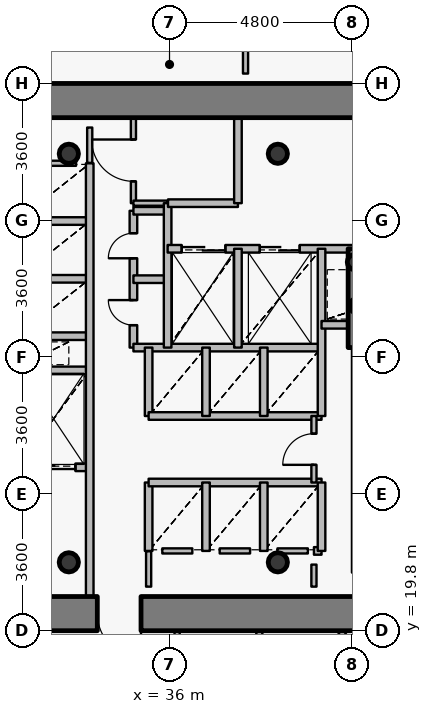
"""IFC4 building model, lengths in metres.
Left out: names, types, materials, properties, quantities, classifications, styles, units other than length and angle.
Written with IfcOpenShell. Run it as: python <this file> out.ifc"""

import sys

from ifc_helpers import new_model, si_unit, direction, frame, frame_2d, origin, origin_2d, place, context, subcontext, project, spatial, rectangle, hollow_circle, extrude, source, transform, mapped, element, fill, save


model = new_model("IFC4")
c1 = context("Model", 3, precision=1e-05, world=origin(), true_north=direction((0.0, 1.0)))
c2 = subcontext(c1, "Body", "Model", "MODEL_VIEW")
j1 = project(units=[si_unit("LENGTHUNIT", "METRE"), si_unit("PLANEANGLEUNIT", "RADIAN")], contexts=[c1])
p1 = place(None, origin())
s1 = spatial("IfcSite", under=j1, at=p1, CompositionType="ELEMENT")
p2 = place(p1, origin())
s2 = spatial("IfcBuilding", under=s1, at=p2, CompositionType="ELEMENT")
p3 = place(p2, frame((0.0, 0.0, 6.0)))
s3 = spatial("IfcBuildingStorey", under=s2, at=p3, CompositionType="ELEMENT", Elevation=6.0)
for number, where, z_axis, x_axis in (
    (1, (33.35, 21.6, 0.0), (0.0, 0.0, 1.0), (1.0, 0.0, 0.0)),
    (2, (38.85, 21.6, 0.0), (0.0, 0.0, 1.0), (1.0, 0.0, 0.0)),
    (3, (38.85, 32.35, 0.0), (0.0, 0.0, 1.0), (1.0, 0.0, 0.0)),
    (4, (33.35, 32.35, 0.0), (0.0, 0.0, 1.0), (1.0, 0.0, 0.0)),
):
    element("IfcColumn", number, at=place(p3, frame(where, z_axis=z_axis, x_axis=x_axis)), inside=s3, PredefinedType="COLUMN", context=c2, shape_type="SweptSolid", body=[
        extrude(hollow_circle(Radius=0.254, WallThickness=0.02, at=origin_2d()), origin(), (0.0, 0.0, 1.0), 4.2),
    ])
for number, where, z_axis, x_axis in (
    (5, (40.95, 28.35, 0.0), (0.0, 0.0, 1.0), (1.0, 0.0, 0.0)),
    (6, (40.88, 29.5, 0.0), (0.0, 0.0, 1.0), (1.0, 0.0, 0.0)),
):
    element("IfcColumn", number, at=place(p3, frame(where, z_axis=z_axis, x_axis=x_axis)), inside=s3, PredefinedType="COLUMN", context=c2, shape_type="SweptSolid", body=[
        extrude(hollow_circle(Radius=0.203, WallThickness=0.016, at=origin_2d()), origin(), (0.0, 0.0, 1.0), 4.2),
    ])
p4 = place(p3, frame((26.75, 33.75, 0.0), z_axis=(0.0, 0.0, 1.0), x_axis=(1.0, 0.0, 0.0)))
e7 = element("IfcWall", 7, at=p4, inside=s3, PredefinedType="SHEAR", context=c2, shape_type="SweptSolid", body=[
    extrude(rectangle(XDim=18.5, YDim=0.9, at=frame_2d((9.25, 0.0))), origin(), (0.0, 0.0, 1.0), 3.35),
])
p5 = place(p3, frame((45.25, 20.25, 0.0), z_axis=(0.0, 0.0, 1.0), x_axis=(-1.0, 0.0, 0.0)))
e8 = element("IfcWall", 8, at=p5, inside=s3, PredefinedType="SHEAR", context=c2, shape_type="SweptSolid", body=[
    extrude(rectangle(XDim=18.5, YDim=0.9, at=frame_2d((9.25, 0.0))), origin(), (0.0, 0.0, 1.0), 3.35),
])
p6 = place(p5, frame((10.0, 0.0, 0.0)))
e9 = element("IfcOpeningElement", 9, at=p6, cuts=e8, PredefinedType="OPENING", context=c2, shape_type="SweptSolid", body=[
    extrude(rectangle(XDim=1.15, YDim=2.15, at=origin_2d()), frame((0.575, 0.46, 1.075), z_axis=(0.0, -1.0, 0.0), x_axis=(1.0, 0.0, 0.0)), (0.0, 0.0, 1.0), 0.92),
])
p7 = place(p3, frame((40.9, 27.25, 0.0), z_axis=(0.0, 0.0, 1.0), x_axis=(0.0, 1.0, 0.0)))
e10 = element("IfcWall", 10, at=p7, inside=s3, PredefinedType="SHEAR", context=c2, shape_type="SweptSolid", body=[
    extrude(rectangle(XDim=2.6, YDim=0.4, at=frame_2d((1.3, 0.0))), origin(), (0.0, 0.0, 1.0), 3.5),
])
p8 = place(p3, frame((32.0, 24.1, 0.0), z_axis=(0.0, 0.0, 1.0), x_axis=(1.0, 0.0, 0.0)))
e11 = element("IfcWall", 11, at=p8, inside=s3, PredefinedType="PARTITIONING", context=c2, shape_type="SweptSolid", body=[
    extrude(rectangle(XDim=1.9, YDim=0.2, at=frame_2d((0.95, 0.0))), origin(), (0.0, 0.0, 1.0), 3.485),
])
p9 = place(p8, frame((0.375, 0.0, 0.0)))
e12 = element("IfcOpeningElement", 12, at=p9, cuts=e11, PredefinedType="OPENING", context=c2, shape_type="SweptSolid", body=[
    extrude(rectangle(XDim=1.15, YDim=2.15, at=origin_2d()), frame((0.575, 0.11, 1.075), z_axis=(0.0, -1.0, 0.0), x_axis=(1.0, 0.0, 0.0)), (0.0, 0.0, 1.0), 0.22),
])
for number, where, z_axis, x_axis in (
    (13, (32.0, 26.65, 0.0), (0.0, 0.0, 1.0), (1.0, 0.0, 0.0)),
    (14, (32.0, 27.55, 0.0), (0.0, 0.0, 1.0), (1.0, 0.0, 0.0)),
    (15, (32.0, 29.06, 0.0), (0.0, 0.0, 1.0), (1.0, 0.0, 0.0)),
    (16, (32.0, 30.58, 0.0), (0.0, 0.0, 1.0), (1.0, 0.0, 0.0)),
):
    element("IfcWall", number, at=place(p3, frame(where, z_axis=z_axis, x_axis=x_axis)), inside=s3, PredefinedType="PARTITIONING", context=c2, shape_type="SweptSolid", body=[
        extrude(rectangle(XDim=1.9, YDim=0.2, at=frame_2d((0.95, 0.0))), origin(), (0.0, 0.0, 1.0), 3.485),
    ])
p10 = place(p3, frame((33.9, 20.7, 0.0), z_axis=(0.0, 0.0, 1.0), x_axis=(0.0, 1.0, 0.0)))
e17 = element("IfcWall", 17, at=p10, inside=s3, PredefinedType="PARTITIONING", context=c2, shape_type="SweptSolid", body=[
    extrude(rectangle(XDim=11.4, YDim=0.2, at=frame_2d((5.7, 0.0))), origin(), (0.0, 0.0, 1.0), 3.485),
])
p11 = place(p3, frame((35.05, 27.25, 0.0), z_axis=(0.0, 0.0, 1.0), x_axis=(0.0, 1.0, 0.0)))
e18 = element("IfcWall", 18, at=p11, inside=s3, PredefinedType="PARTITIONING", context=c2, shape_type="SweptSolid", body=[
    extrude(rectangle(XDim=3.6, YDim=0.2, at=frame_2d((1.8, 0.0))), origin(), (0.0, 0.0, 1.0), 3.9),
])
p12 = place(p11, frame((0.59, 0.0, 0.0)))
e19 = element("IfcOpeningElement", 19, at=p12, cuts=e18, PredefinedType="OPENING", context=c2, shape_type="SweptSolid", body=[
    extrude(rectangle(XDim=0.66, YDim=2.05, at=origin_2d()), frame((0.33, 0.11, 1.025), z_axis=(0.0, -1.0, 0.0), x_axis=(1.0, 0.0, 0.0)), (0.0, 0.0, 1.0), 0.22),
])
p13 = place(p11, frame((2.35, 0.0, 0.0)))
e20 = element("IfcOpeningElement", 20, at=p13, cuts=e18, PredefinedType="OPENING", context=c2, shape_type="SweptSolid", body=[
    extrude(rectangle(XDim=0.66, YDim=2.05, at=origin_2d()), frame((0.33, 0.11, 1.025), z_axis=(0.0, -1.0, 0.0), x_axis=(1.0, 0.0, 0.0)), (0.0, 0.0, 1.0), 0.22),
])
p14 = place(p3, frame((35.05, 27.25, 0.0), z_axis=(0.0, 0.0, 1.0), x_axis=(1.0, 0.0, 0.0)))
e21 = element("IfcWall", 21, at=p14, inside=s3, PredefinedType="PARTITIONING", context=c2, shape_type="SweptSolid", body=[
    extrude(rectangle(XDim=4.95, YDim=0.2, at=frame_2d((2.475, 0.0))), origin(), (0.0, 0.0, 1.0), 3.485),
])
for number, where, z_axis, x_axis in (
    (22, (35.05, 29.05, 0.0), (0.0, 0.0, 1.0), (1.0, 0.0, 0.0)),
    (23, (35.05, 30.85, 0.0), (0.0, 0.0, 1.0), (1.0, 0.0, 0.0)),
):
    element("IfcWall", number, at=place(p3, frame(where, z_axis=z_axis, x_axis=x_axis)), inside=s3, PredefinedType="PARTITIONING", context=c2, shape_type="SweptSolid", body=[
        extrude(rectangle(XDim=0.9, YDim=0.2, at=frame_2d((0.45, 0.0))), origin(), (0.0, 0.0, 1.0), 3.9),
    ])
p15 = place(p3, frame((35.05, 31.05, 0.0), z_axis=(0.0, 0.0, 1.0), x_axis=(0.0, 1.0, 0.0)))
e24 = element("IfcWall", 24, at=p15, inside=s3, PredefinedType="PARTITIONING", context=c2, shape_type="SweptSolid", body=[
    extrude(rectangle(XDim=2.25, YDim=0.135, at=frame_2d((1.125, 0.0))), origin(), (0.0, 0.0, 1.0), 3.485),
])
p16 = place(p15, frame((0.575, 0.0, 0.0)))
e25 = element("IfcOpeningElement", 25, at=p16, cuts=e24, PredefinedType="OPENING", context=c2, shape_type="SweptSolid", body=[
    extrude(rectangle(XDim=1.1, YDim=2.15, at=origin_2d()), frame((0.55, 0.078, 1.075), z_axis=(0.0, -1.0, 0.0), x_axis=(1.0, 0.0, 0.0)), (0.0, 0.0, 1.0), 0.155),
])
p17 = place(p3, frame((35.05, 31.05, 0.0), z_axis=(0.0, 0.0, 1.0), x_axis=(1.0, 0.0, 0.0)))
e26 = element("IfcWall", 26, at=p17, inside=s3, PredefinedType="PARTITIONING", context=c2, shape_type="SweptSolid", body=[
    extrude(rectangle(XDim=0.9, YDim=0.135, at=frame_2d((0.45, 0.0))), origin(), (0.0, 0.0, 1.0), 3.9),
])
p18 = place(p3, frame((35.45, 21.9, 0.0), z_axis=(0.0, 0.0, 1.0), x_axis=(0.0, 1.0, 0.0)))
e27 = element("IfcWall", 27, at=p18, inside=s3, PredefinedType="PARTITIONING", context=c2, shape_type="SweptSolid", body=[
    extrude(rectangle(XDim=1.8, YDim=0.2, at=frame_2d((0.9, 0.0))), origin(), (0.0, 0.0, 1.0), 3.9),
])
p19 = place(p3, frame((35.45, 23.7, 0.0), z_axis=(0.0, 0.0, 1.0), x_axis=(1.0, 0.0, 0.0)))
e28 = element("IfcWall", 28, at=p19, inside=s3, PredefinedType="PARTITIONING", context=c2, shape_type="SweptSolid", body=[
    extrude(rectangle(XDim=4.55, YDim=0.2, at=frame_2d((2.275, 0.0))), origin(), (0.0, 0.0, 1.0), 3.485),
])
p20 = place(p3, frame((35.45, 25.45, 0.0), z_axis=(0.0, 0.0, 1.0), x_axis=(0.0, 1.0, 0.0)))
e29 = element("IfcWall", 29, at=p20, inside=s3, PredefinedType="PARTITIONING", context=c2, shape_type="SweptSolid", body=[
    extrude(rectangle(XDim=1.8, YDim=0.2, at=frame_2d((0.9, 0.0))), origin(), (0.0, 0.0, 1.0), 3.9),
])
p21 = place(p3, frame((35.45, 25.45, 0.0), z_axis=(0.0, 0.0, 1.0), x_axis=(1.0, 0.0, 0.0)))
e30 = element("IfcWall", 30, at=p21, inside=s3, PredefinedType="PARTITIONING", context=c2, shape_type="SweptSolid", body=[
    extrude(rectangle(XDim=4.55, YDim=0.2, at=frame_2d((2.275, 0.0))), origin(), (0.0, 0.0, 1.0), 3.485),
])
p22 = place(p3, frame((35.95, 27.25, 0.0), z_axis=(0.0, 0.0, 1.0), x_axis=(0.0, 1.0, 0.0)))
e31 = element("IfcWall", 31, at=p22, inside=s3, PredefinedType="PARTITIONING", context=c2, shape_type="SweptSolid", body=[
    extrude(rectangle(XDim=3.8, YDim=0.2, at=frame_2d((1.9, 0.0))), origin(), (0.0, 0.0, 1.0), 3.9),
])
p23 = place(p3, frame((35.95, 29.85, 0.0), z_axis=(0.0, 0.0, 1.0), x_axis=(1.0, 0.0, 0.0)))
e32 = element("IfcWall", 32, at=p23, inside=s3, PredefinedType="PARTITIONING", context=c2, shape_type="SweptSolid", body=[
    extrude(rectangle(XDim=8.49, YDim=0.2, at=frame_2d((4.245, 0.0))), origin(), (0.0, 0.0, 1.0), 3.485),
])
p24 = place(p23, frame((6.1, 0.0, 0.0)))
e33 = element("IfcOpeningElement", 33, at=p24, cuts=e32, PredefinedType="OPENING", context=c2, shape_type="SweptSolid", body=[
    extrude(rectangle(XDim=1.2, YDim=2.15, at=origin_2d()), frame((0.6, 0.11, 1.075), z_axis=(0.0, -1.0, 0.0), x_axis=(1.0, 0.0, 0.0)), (0.0, 0.0, 1.0), 0.22),
])
p25 = place(p23, frame((0.37, 0.0, 0.0)))
e34 = element("IfcOpeningElement", 34, at=p25, cuts=e32, PredefinedType="OPENING", context=c2, shape_type="SweptSolid", body=[
    extrude(rectangle(XDim=1.15, YDim=2.15, at=origin_2d()), frame((0.575, 0.11, 1.075), z_axis=(0.0, -1.0, 0.0), x_axis=(1.0, 0.0, 0.0)), (0.0, 0.0, 1.0), 0.22),
])
p26 = place(p23, frame((2.425, 0.0, 0.0)))
e35 = element("IfcOpeningElement", 35, at=p26, cuts=e32, PredefinedType="OPENING", context=c2, shape_type="SweptSolid", body=[
    extrude(rectangle(XDim=1.05, YDim=2.15, at=origin_2d()), frame((0.525, 0.11, 1.075), z_axis=(0.0, -1.0, 0.0), x_axis=(1.0, 0.0, 0.0)), (0.0, 0.0, 1.0), 0.22),
])
p27 = place(p3, frame((35.96, 31.05, 0.0), z_axis=(0.0, 0.0, 1.0), x_axis=(1.0, 0.0, 0.0)))
e36 = element("IfcWall", 36, at=p27, inside=s3, PredefinedType="PARTITIONING", context=c2, shape_type="SweptSolid", body=[
    extrude(rectangle(XDim=1.84, YDim=0.2, at=frame_2d((0.92, 0.0))), origin(), (0.0, 0.0, 1.0), 3.9),
])
p28 = place(p3, frame((36.2, 17.9, 0.0), z_axis=(0.0, 0.0, 1.0), x_axis=(0.0, 1.0, 0.0)))
e37 = element("IfcWall", 37, at=p28, inside=s3, PredefinedType="PARTITIONING", context=c2, shape_type="SweptSolid", body=[
    extrude(rectangle(XDim=1.9, YDim=0.135, at=frame_2d((0.95, 0.0))), origin(), (0.0, 0.0, 1.0), 3.085),
])
for number, where, z_axis, x_axis in (
    (38, (36.96, 21.9, 0.0), (0.0, 0.0, 1.0), (0.0, 1.0, 0.0)),
    (39, (36.96, 25.45, 0.0), (0.0, 0.0, 1.0), (0.0, 1.0, 0.0)),
):
    element("IfcWall", number, at=place(p3, frame(where, z_axis=z_axis, x_axis=x_axis)), inside=s3, PredefinedType="PARTITIONING", context=c2, shape_type="SweptSolid", body=[
        extrude(rectangle(XDim=1.8, YDim=0.2, at=frame_2d((0.9, 0.0))), origin(), (0.0, 0.0, 1.0), 3.9),
    ])
p29 = place(p3, frame((37.8, 27.25, 0.0), z_axis=(0.0, 0.0, 1.0), x_axis=(0.0, 1.0, 0.0)))
e40 = element("IfcWall", 40, at=p29, inside=s3, PredefinedType="PARTITIONING", context=c2, shape_type="SweptSolid", body=[
    extrude(rectangle(XDim=2.6, YDim=0.2, at=frame_2d((1.3, 0.0))), origin(), (0.0, 0.0, 1.0), 3.9),
])
p30 = place(p3, frame((37.8, 31.05, 0.0), z_axis=(0.0, 0.0, 1.0), x_axis=(0.0, 1.0, 0.0)))
e41 = element("IfcWall", 41, at=p30, inside=s3, PredefinedType="PARTITIONING", context=c2, shape_type="SweptSolid", body=[
    extrude(rectangle(XDim=2.25, YDim=0.2, at=frame_2d((1.125, 0.0))), origin(), (0.0, 0.0, 1.0), 3.485),
])
p31 = place(p3, frame((38.339, 19.8, 0.0), z_axis=(0.0, 0.0, 1.0), x_axis=(0.309020911431, -0.951055243557, 0.0)))
e42 = element("IfcWall", 42, at=p31, inside=s3, PredefinedType="PARTITIONING", context=c2, shape_type="SweptSolid", body=[
    extrude(rectangle(XDim=18.723, YDim=0.15, at=frame_2d((9.362, 0.0))), origin(), (0.0, 0.0, 1.0), 3.285),
])
p32 = place(p31, frame((4.76, 0.0, 0.0)))
e43 = element("IfcOpeningElement", 43, at=p32, cuts=e42, PredefinedType="OPENING", context=c2, shape_type="SweptSolid", body=[
    extrude(rectangle(XDim=0.82, YDim=2.1, at=origin_2d()), frame((0.41, 0.085, 1.05), z_axis=(0.0, -1.0, 0.0), x_axis=(1.0, 0.0, 0.0)), (0.0, 0.0, 1.0), 0.17),
])
p33 = place(p31, frame((13.966, 0.0, 0.0)))
e44 = element("IfcOpeningElement", 44, at=p33, cuts=e42, PredefinedType="OPENING", context=c2, shape_type="SweptSolid", body=[
    extrude(rectangle(XDim=1.05, YDim=2.15, at=origin_2d()), frame((0.525, 0.085, 1.075), z_axis=(0.0, -1.0, 0.0), x_axis=(1.0, 0.0, 0.0)), (0.0, 0.0, 1.0), 0.17),
])
for number, where, z_axis, x_axis in (
    (45, (38.48, 21.9, 0.0), (0.0, 0.0, 1.0), (0.0, 1.0, 0.0)),
    (46, (38.48, 25.45, 0.0), (0.0, 0.0, 1.0), (0.0, 1.0, 0.0)),
):
    element("IfcWall", number, at=place(p3, frame(where, z_axis=z_axis, x_axis=x_axis)), inside=s3, PredefinedType="PARTITIONING", context=c2, shape_type="SweptSolid", body=[
        extrude(rectangle(XDim=1.8, YDim=0.2, at=frame_2d((0.9, 0.0))), origin(), (0.0, 0.0, 1.0), 3.9),
    ])
p34 = place(p3, frame((39.8, 21.9, 0.0), z_axis=(0.0, 0.0, 1.0), x_axis=(1.0, 0.0, 0.0)))
e47 = element("IfcWall", 47, at=p34, inside=s3, PredefinedType="PARTITIONING", context=c2, shape_type="SweptSolid", body=[
    extrude(rectangle(XDim=0.2, YDim=0.2, at=frame_2d((0.1, 0.0))), origin(), (0.0, 0.0, 1.0), 3.9),
])
p35 = place(p3, frame((39.8, 23.7, 0.0), z_axis=(0.0, 0.0, 1.0), x_axis=(0.0, 1.0, 0.0)))
e48 = element("IfcWall", 48, at=p35, inside=s3, PredefinedType="PARTITIONING", context=c2, shape_type="SweptSolid", body=[
    extrude(rectangle(XDim=1.75, YDim=0.135, at=frame_2d((0.875, 0.0))), origin(), (0.0, 0.0, 1.0), 3.9),
])
p36 = place(p35, frame((0.465, 0.0, 0.0)))
e49 = element("IfcOpeningElement", 49, at=p36, cuts=e48, PredefinedType="OPENING", context=c2, shape_type="SweptSolid", body=[
    extrude(rectangle(XDim=0.82, YDim=2.1, at=origin_2d()), frame((0.41, 0.078, 1.05), z_axis=(0.0, -1.0, 0.0), x_axis=(1.0, 0.0, 0.0)), (0.0, 0.0, 1.0), 0.155),
])
p37 = place(p3, frame((40.0, 21.9, 0.0), z_axis=(0.0, 0.0, 1.0), x_axis=(0.0, 1.0, 0.0)))
e50 = element("IfcWall", 50, at=p37, inside=s3, PredefinedType="PARTITIONING", context=c2, shape_type="SweptSolid", body=[
    extrude(rectangle(XDim=1.8, YDim=0.2, at=frame_2d((0.9, 0.0))), origin(), (0.0, 0.0, 1.0), 3.9),
])
p38 = place(p3, frame((40.0, 25.45, 0.0), z_axis=(0.0, 0.0, 1.0), x_axis=(0.0, 1.0, 0.0)))
e51 = element("IfcWall", 51, at=p38, inside=s3, PredefinedType="PARTITIONING", context=c2, shape_type="SweptSolid", body=[
    extrude(rectangle(XDim=4.4, YDim=0.2, at=frame_2d((2.2, 0.0))), origin(), (0.0, 0.0, 1.0), 3.9),
])
p39 = place(p3, frame((40.0, 27.85, 0.0), z_axis=(0.0, 0.0, 1.0), x_axis=(1.0, 0.0, 0.0)))
e52 = element("IfcWall", 52, at=p39, inside=s3, PredefinedType="PARTITIONING", context=c2, shape_type="SweptSolid", body=[
    extrude(rectangle(XDim=0.9, YDim=0.2, at=frame_2d((0.45, 0.0))), origin(), (0.0, 0.0, 1.0), 3.9),
])
p40 = place(p3, frame((40.499, 19.8, 0.0), z_axis=(0.0, 0.0, 1.0), x_axis=(0.529919953547, -0.848047665425, 0.0)))
e53 = element("IfcWall", 53, at=p40, inside=s3, PredefinedType="PARTITIONING", context=c2, shape_type="SweptSolid", body=[
    extrude(rectangle(XDim=18.893, YDim=0.15, at=frame_2d((9.447, 0.0))), origin(), (0.0, 0.0, 1.0), 3.285),
])
p41 = place(p40, frame((13.906, 0.0, 0.0)))
e54 = element("IfcOpeningElement", 54, at=p41, cuts=e53, PredefinedType="OPENING", context=c2, shape_type="SweptSolid", body=[
    extrude(rectangle(XDim=1.05, YDim=2.15, at=origin_2d()), frame((0.525, 0.085, 1.075), z_axis=(0.0, -1.0, 0.0), x_axis=(1.0, 0.0, 0.0)), (0.0, 0.0, 1.0), 0.17),
])
p42 = place(p3, frame((40.9, 21.33, 0.0), z_axis=(0.0, 0.0, 1.0), x_axis=(0.0, 1.0, 0.0)))
e55 = element("IfcWall", 55, at=p42, inside=s3, PredefinedType="PARTITIONING", context=c2, shape_type="SweptSolid", body=[
    extrude(rectangle(XDim=5.91, YDim=0.2, at=frame_2d((2.955, 0.0))), origin(), (0.0, 0.0, 1.0), 3.435),
])
p43 = place(p3, frame((36.6, 21.9, 0.0), z_axis=(0.0, 0.0, 1.0), x_axis=(-1.0, 0.0, 0.0)))
e56 = element("IfcWall", 56, at=p43, inside=s3, PredefinedType="PARTITIONING", context=c2, shape_type="SweptSolid", body=[
    extrude(rectangle(XDim=0.79, YDim=0.135, at=frame_2d((0.395, 0.0))), origin(), (0.0, 0.0, 1.0), 3.9),
])
p44 = place(p3, frame((38.12, 21.9, 0.0), z_axis=(0.0, 0.0, 1.0), x_axis=(-1.0, 0.0, 0.0)))
e57 = element("IfcWall", 57, at=p44, inside=s3, PredefinedType="PARTITIONING", context=c2, shape_type="SweptSolid", body=[
    extrude(rectangle(XDim=0.8, YDim=0.135, at=frame_2d((0.4, 0.0))), origin(), (0.0, 0.0, 1.0), 3.9),
])
p45 = place(p3, frame((39.64, 21.9, 0.0), z_axis=(0.0, 0.0, 1.0), x_axis=(-1.0, 0.0, 0.0)))
e58 = element("IfcWall", 58, at=p45, inside=s3, PredefinedType="PARTITIONING", context=c2, shape_type="SweptSolid", body=[
    extrude(rectangle(XDim=0.8, YDim=0.135, at=frame_2d((0.4, 0.0))), origin(), (0.0, 0.0, 1.0), 3.485),
])
p46 = place(p3, frame((32.36, 32.1, 0.0), z_axis=(0.0, 0.0, 1.0), x_axis=(1.0, 0.0, 0.0)))
e59 = element("IfcWall", 59, at=p46, inside=s3, PredefinedType="PARTITIONING", context=c2, shape_type="SweptSolid", body=[
    extrude(rectangle(XDim=1.18, YDim=0.135, at=frame_2d((0.59, 0.0))), origin(), (0.0, 0.0, 1.0), 3.485),
])
p47 = place(p3, frame((39.8, 20.96, 0.0), z_axis=(0.0, 0.0, 1.0), x_axis=(0.0, 1.0, 0.0)))
e60 = element("IfcWall", 60, at=p47, inside=s3, PredefinedType="PARTITIONING", context=c2, shape_type="SweptSolid", body=[
    extrude(rectangle(XDim=0.58, YDim=0.135, at=frame_2d((0.29, 0.0))), origin(), (0.0, 0.0, 1.0), 3.435),
])
for number, where, z_axis, x_axis in (
    (61, (35.45, 21.89, 0.0), (0.0, 0.0, 1.0), (0.0, -1.0, 0.0)),
    (62, (33.9, 32.11, 0.0), (0.0, 0.0, 1.0), (0.0, 1.0, 0.0)),
):
    element("IfcWall", number, at=place(p3, frame(where, z_axis=z_axis, x_axis=x_axis)), inside=s3, PredefinedType="PARTITIONING", context=c2, shape_type="SweptSolid", body=[
        extrude(rectangle(XDim=0.93, YDim=0.135, at=frame_2d((0.465, 0.0))), origin(), (0.0, 0.0, 1.0), 3.485),
    ])
p48 = place(p3, frame((38.0, 34.46, 0.0), z_axis=(0.0, 0.0, 1.0), x_axis=(0.0, 1.0, 0.0)))
e63 = element("IfcWall", 63, at=p48, inside=s3, PredefinedType="PARTITIONING", context=c2, shape_type="SweptSolid", body=[
    extrude(rectangle(XDim=1.64, YDim=0.135, at=frame_2d((0.82, 0.0))), origin(), (0.0, 0.0, 1.0), 3.9),
])
m1 = source(origin(), c2, "Body", "SweptSolid", [
    extrude(rectangle(XDim=1.15, YDim=2.15, at=origin_2d()), frame((0.575, 0.025, 1.075), z_axis=(0.0, -1.0, 0.0), x_axis=(1.0, 0.0, 0.0)), (0.0, 0.0, 1.0), 0.05),
])
p49 = place(p6, origin())
e64 = element("IfcDoor", 64, at=p49, inside=s3, OperationType="SINGLE_SWING_LEFT", PredefinedType="DOOR", context=c2, shape_type="MappedRepresentation", body=[
    mapped(m1, transform((0.0, 0.0, 0.0), x_axis=(1.0, 0.0, 0.0), y_axis=(0.0, 1.0, 0.0), z_axis=(0.0, 0.0, 1.0), scale=1.0)),
])
fill(e9, e64)
m2 = source(origin(), c2, "Body", "SweptSolid", [
    extrude(rectangle(XDim=1.15, YDim=2.15, at=origin_2d()), frame((0.575, 0.025, 1.075), z_axis=(0.0, -1.0, 0.0), x_axis=(1.0, 0.0, 0.0)), (0.0, 0.0, 1.0), 0.05),
])
p50 = place(p25, origin())
e65 = element("IfcDoor", 65, at=p50, inside=s3, OperationType="DOUBLE_DOOR_SLIDING", PredefinedType="USERDEFINED", context=c2, shape_type="MappedRepresentation", body=[
    mapped(m2, transform((0.0, 0.0, 0.0), x_axis=(1.0, 0.0, 0.0), y_axis=(0.0, 1.0, 0.0), z_axis=(0.0, 0.0, 1.0), scale=1.0)),
])
fill(e34, e65)
p51 = place(p9, origin())
e66 = element("IfcDoor", 66, at=p51, inside=s3, OperationType="DOUBLE_DOOR_SLIDING", PredefinedType="USERDEFINED", context=c2, shape_type="MappedRepresentation", body=[
    mapped(m2, transform((0.0, 0.0, 0.0), x_axis=(1.0, 0.0, 0.0), y_axis=(0.0, 1.0, 0.0), z_axis=(0.0, 0.0, 1.0), scale=1.0)),
])
fill(e12, e66)
m3 = source(origin(), c2, "Body", "SweptSolid", [
    extrude(rectangle(XDim=1.05, YDim=2.15, at=origin_2d()), frame((0.525, 0.025, 1.075), z_axis=(0.0, -1.0, 0.0), x_axis=(1.0, 0.0, 0.0)), (0.0, 0.0, 1.0), 0.05),
])
p52 = place(p26, origin())
e67 = element("IfcDoor", 67, at=p52, inside=s3, OperationType="DOUBLE_DOOR_SLIDING", PredefinedType="USERDEFINED", context=c2, shape_type="MappedRepresentation", body=[
    mapped(m3, transform((0.0, 0.0, 0.0), x_axis=(1.0, 0.0, 0.0), y_axis=(0.0, 1.0, 0.0), z_axis=(0.0, 0.0, 1.0), scale=1.0)),
])
fill(e35, e67)
m4 = source(origin(), c2, "Body", "SweptSolid", [
    extrude(rectangle(XDim=0.66, YDim=2.05, at=origin_2d()), frame((0.33, 0.025, 1.025), z_axis=(0.0, -1.0, 0.0), x_axis=(1.0, 0.0, 0.0)), (0.0, 0.0, 1.0), 0.05),
])
p53 = place(p12, origin())
e68 = element("IfcDoor", 68, at=p53, inside=s3, OperationType="SINGLE_SWING_RIGHT", PredefinedType="USERDEFINED", context=c2, shape_type="MappedRepresentation", body=[
    mapped(m4, transform((0.0, 0.0, 0.0), x_axis=(1.0, 0.0, 0.0), y_axis=(0.0, 1.0, 0.0), z_axis=(0.0, 0.0, 1.0), scale=1.0)),
])
fill(e19, e68)
p54 = place(p13, origin())
e69 = element("IfcDoor", 69, at=p54, inside=s3, OperationType="SINGLE_SWING_LEFT", PredefinedType="USERDEFINED", context=c2, shape_type="MappedRepresentation", body=[
    mapped(m4, transform((0.0, 0.0, 0.0), x_axis=(1.0, 0.0, 0.0), y_axis=(0.0, 1.0, 0.0), z_axis=(0.0, 0.0, 1.0), scale=1.0)),
])
fill(e20, e69)
m5 = source(origin(), c2, "Body", "SweptSolid", [
    extrude(rectangle(XDim=1.1, YDim=2.15, at=origin_2d()), frame((0.55, 0.025, 1.075), z_axis=(0.0, -1.0, 0.0), x_axis=(1.0, 0.0, 0.0)), (0.0, 0.0, 1.0), 0.05),
])
p55 = place(p16, origin())
e70 = element("IfcDoor", 70, at=p55, inside=s3, OperationType="SINGLE_SWING_RIGHT", PredefinedType="DOOR", context=c2, shape_type="MappedRepresentation", body=[
    mapped(m5, transform((0.0, 0.0, 0.0), x_axis=(1.0, 0.0, 0.0), y_axis=(0.0, 1.0, 0.0), z_axis=(0.0, 0.0, 1.0), scale=1.0)),
])
fill(e25, e70)
m6 = source(origin(), c2, "Body", "SweptSolid", [
    extrude(rectangle(XDim=0.82, YDim=2.1, at=origin_2d()), frame((0.41, 0.025, 1.05), z_axis=(0.0, -1.0, 0.0), x_axis=(1.0, 0.0, 0.0)), (0.0, 0.0, 1.0), 0.05),
])
p56 = place(p36, origin())
e71 = element("IfcDoor", 71, at=p56, inside=s3, OperationType="SINGLE_SWING_LEFT", PredefinedType="DOOR", context=c2, shape_type="MappedRepresentation", body=[
    mapped(m6, transform((0.0, 0.0, 0.0), x_axis=(1.0, 0.0, 0.0), y_axis=(0.0, 1.0, 0.0), z_axis=(0.0, 0.0, 1.0), scale=1.0)),
])
fill(e49, e71)
save(model, sys.argv[1])
